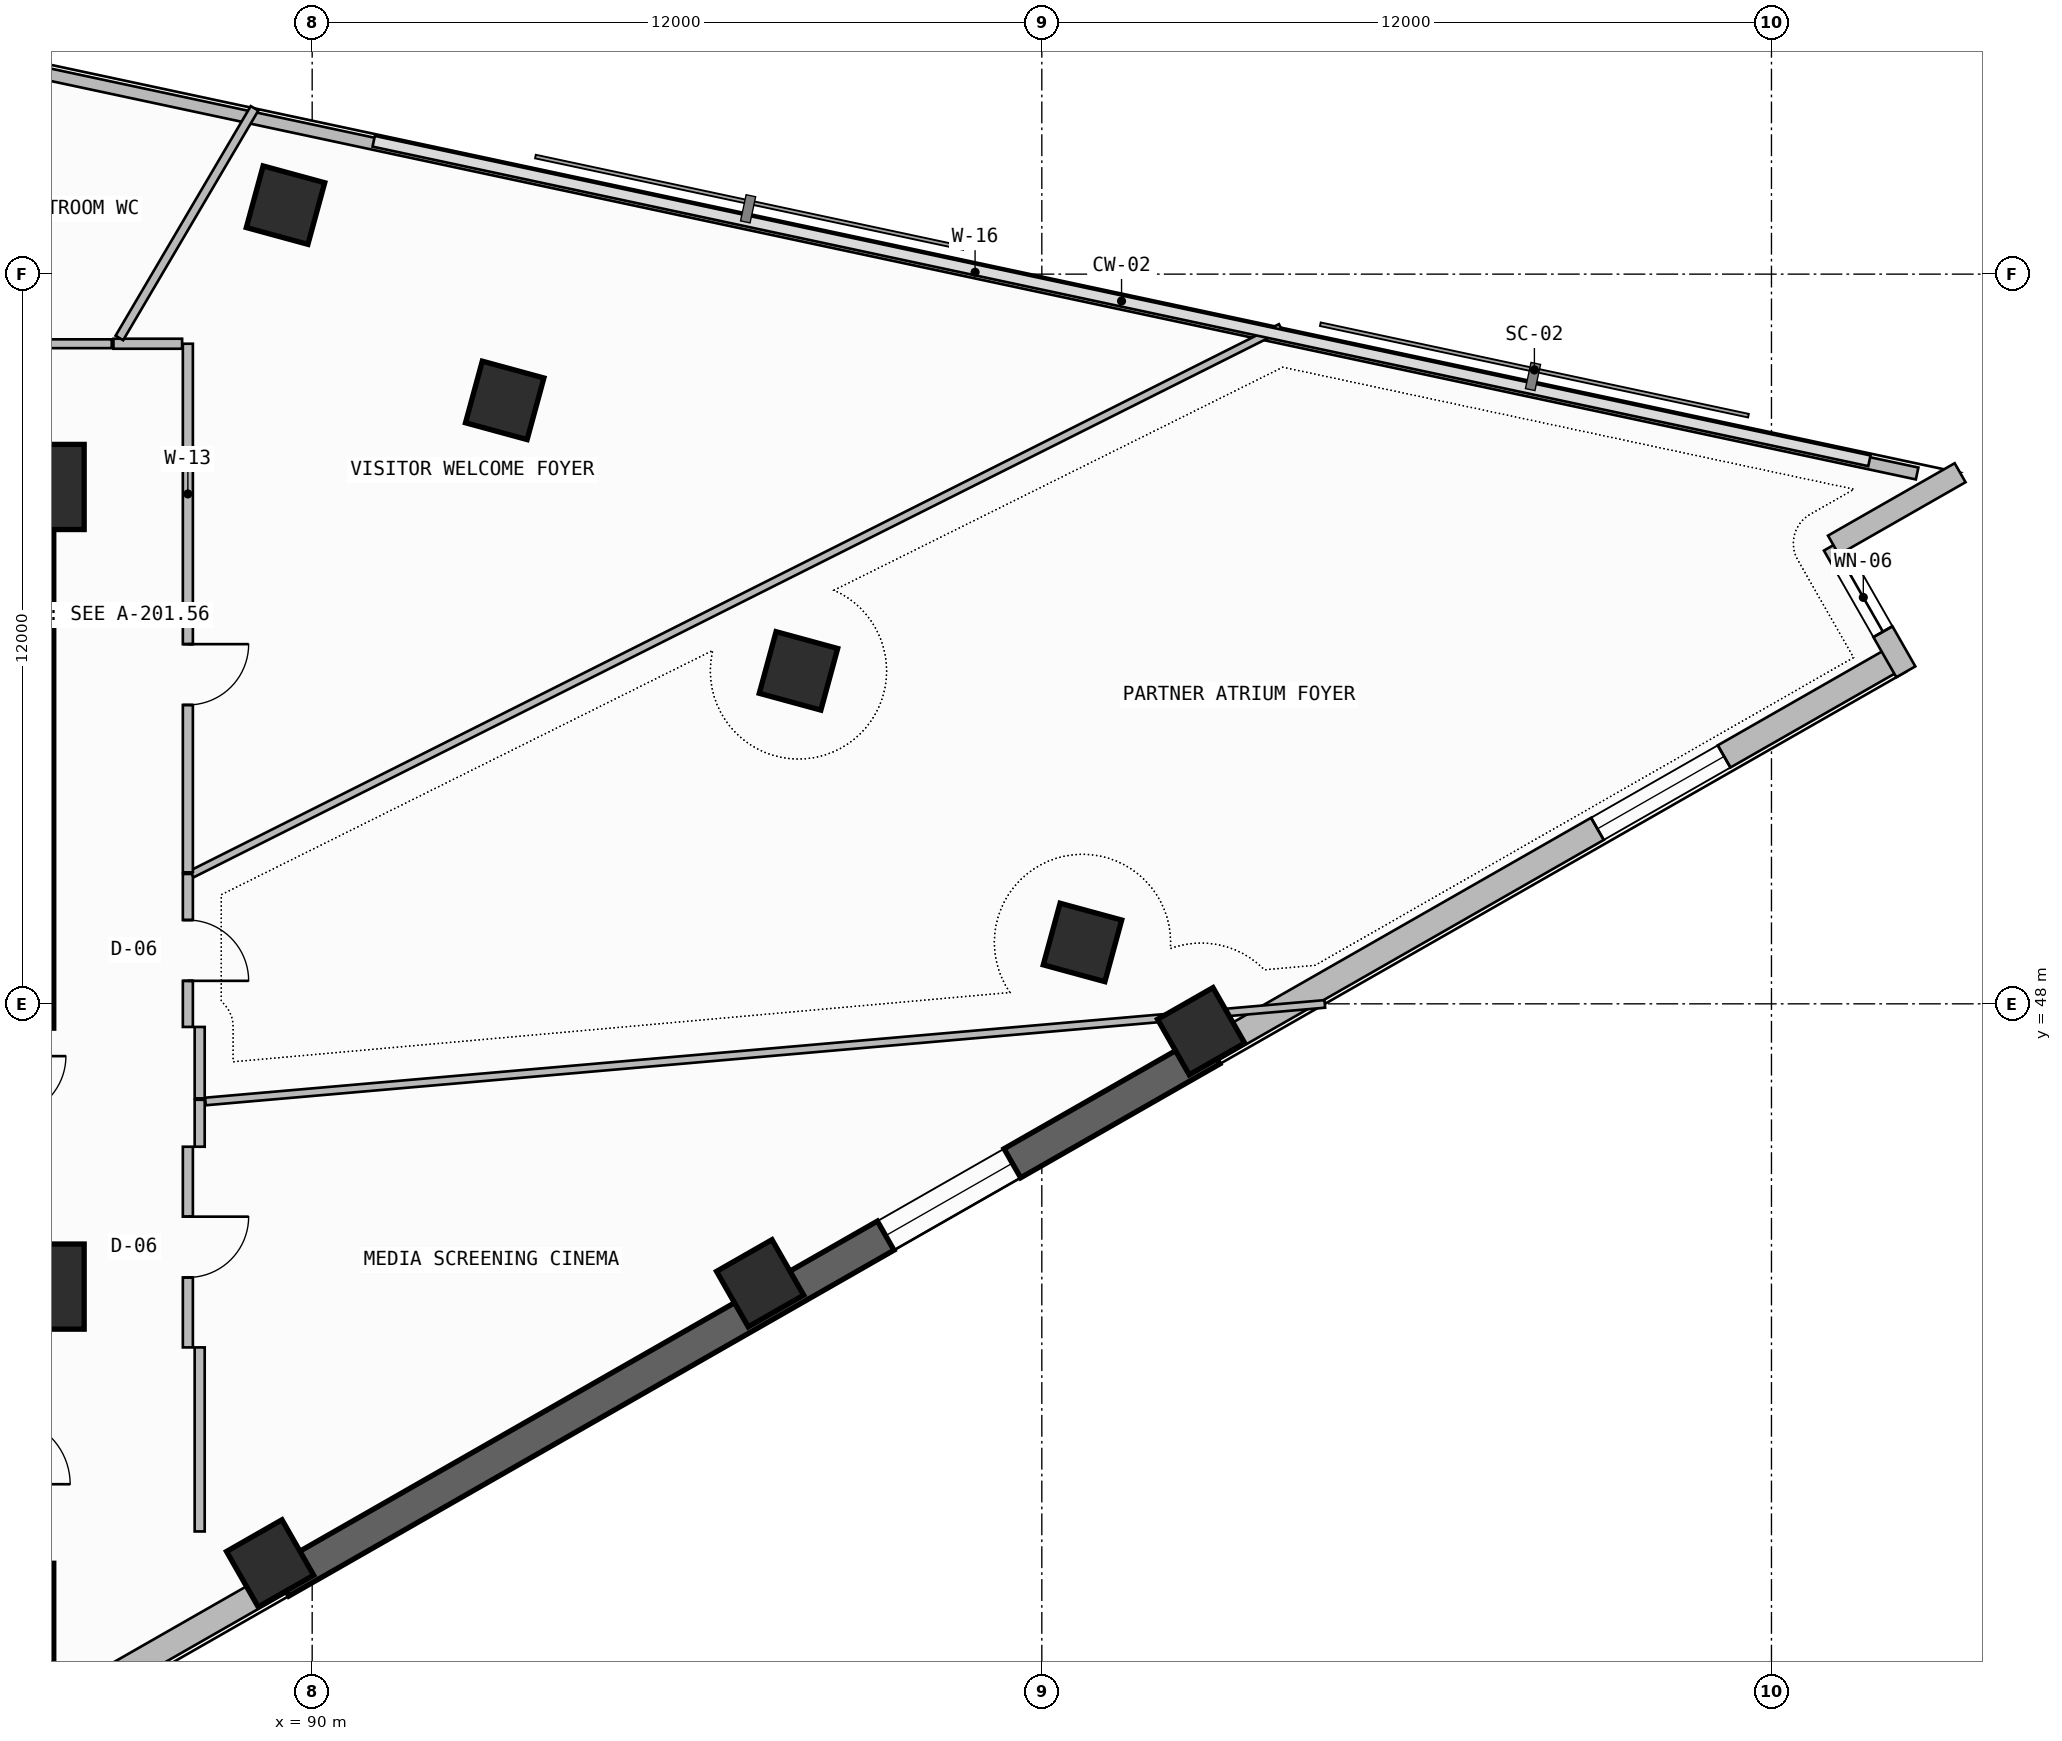
"""IFC4 building model, lengths in metres.
Left out: names, types, materials, properties, quantities, classifications, styles, units other than length and angle.
Written with IfcOpenShell. Run it as: python <this file> out.ifc"""

import sys

from ifc_helpers import new_model, si_unit, direction, frame, frame_2d, origin, origin_2d, place, context, subcontext, project, spatial, rectangle, extrude, element, fill, save


model = new_model("IFC4")
c1 = context("Model", 3, precision=1e-05, world=origin(), true_north=direction((0.0, 1.0)))
c2 = subcontext(c1, "Body", "Model", "MODEL_VIEW")
j1 = project(units=[si_unit("LENGTHUNIT", "METRE"), si_unit("PLANEANGLEUNIT", "RADIAN")], contexts=[c1])
p1 = place(None, origin())
s1 = spatial("IfcSite", under=j1, at=p1, CompositionType="ELEMENT")
p2 = place(p1, origin())
s2 = spatial("IfcBuilding", under=s1, at=p2, CompositionType="ELEMENT")
p3 = place(p2, frame((0.0, 0.0, 200.9)))
s3 = spatial("IfcBuildingStorey", under=s2, at=p3, CompositionType="ELEMENT", Elevation=200.9)
p4 = place(p3, frame((85.375, 35.5, -0.4), z_axis=(0.0, 0.0, 1.0), x_axis=(0.0, 1.0, 0.0)))
e1 = element("IfcWall", 1, at=p4, inside=s3, PredefinedType="SHEAR", context=c2, shape_type="SweptSolid", body=[
    extrude(rectangle(XDim=3.3, YDim=0.75, at=frame_2d((1.65, 0.0))), origin(), (0.0, 0.0, 1.0), 3.66),
])
p5 = place(p3, frame((72.0, 56.425, -0.4), z_axis=(0.0, 0.0, 1.0), x_axis=(1.0, 0.0, 0.0)))
e2 = element("IfcWall", 2, at=p5, inside=s3, PredefinedType="SHEAR", context=c2, shape_type="SweptSolid", body=[
    extrude(rectangle(XDim=13.75, YDim=0.75, at=frame_2d((6.875, 0.0))), origin(), (0.0, 0.0, 1.0), 3.66),
])
p6 = place(p3, frame((85.375, 47.6, -0.4), z_axis=(0.0, 0.0, 1.0), x_axis=(0.0, 1.0, 0.0)))
e3 = element("IfcWall", 3, at=p6, inside=s3, PredefinedType="SHEAR", context=c2, shape_type="SweptSolid", body=[
    extrude(rectangle(XDim=8.45, YDim=0.75, at=frame_2d((4.225, 0.0))), origin(), (0.0, 0.0, 1.0), 3.66),
])
for number, where, z_axis, x_axis in (
    (4, (85.55, 43.35, 0.0), (0.0, 0.0, 1.0), (1.0, 0.0, 0.0)),
    (5, (85.55, 56.5, 0.0), (0.0, 0.0, 1.0), (1.0, 0.0, 0.0)),
):
    element("IfcColumn", number, at=place(p3, frame(where, z_axis=z_axis, x_axis=x_axis)), inside=s3, PredefinedType="COLUMN", context=c2, shape_type="SweptSolid", body=[
        extrude(rectangle(XDim=1.4, YDim=1.4, at=origin_2d()), origin(), (0.0, 0.0, 1.0), 3.52),
    ])
for number, where, z_axis, x_axis in (
    (6, (89.308, 38.799, -0.4), (0.0, 0.0, 1.0), (0.868, 0.496, 0.0)),
    (7, (97.367, 43.405, -0.4), (0.0, 0.0, 1.0), (0.868, 0.496, 0.0)),
):
    element("IfcColumn", number, at=place(p3, frame(where, z_axis=z_axis, x_axis=x_axis)), inside=s3, PredefinedType="COLUMN", context=c2, shape_type="SweptSolid", body=[
        extrude(rectangle(XDim=1.05, YDim=1.05, at=origin_2d()), origin(), (0.0, 0.0, 1.0), 3.92),
    ])
p7 = place(p3, frame((104.62, 47.55, 0.0), z_axis=(0.0, 0.0, 1.0), x_axis=(0.868198814489, 0.496216503675, 0.0)))
e8 = element("IfcColumn", 8, at=p7, inside=s3, PredefinedType="COLUMN", context=c2, shape_type="SweptSolid", body=[
    extrude(rectangle(XDim=1.05, YDim=1.05, at=origin_2d()), origin(), (0.0, 0.0, 1.0), 3.52),
])
for number, where, z_axis, x_axis in (
    (9, (102.669, 49.01, -0.4), (0.0, 0.0, 1.0), (0.263, 0.965, 0.0)),
    (10, (97.998, 53.475, -0.4), (0.0, 0.0, 1.0), (0.263, 0.965, 0.0)),
    (11, (93.167, 57.924, -0.4), (0.0, 0.0, 1.0), (0.263, 0.965, 0.0)),
):
    element("IfcColumn", number, at=place(p3, frame(where, z_axis=z_axis, x_axis=x_axis)), inside=s3, PredefinedType="COLUMN", context=c2, shape_type="SweptSolid", body=[
        extrude(rectangle(XDim=1.05, YDim=1.05, at=origin_2d()), origin(), (0.0, 0.0, 1.0), 3.92),
    ])
p8 = place(p3, frame((89.562, 61.135, 0.0), z_axis=(0.0, 0.0, 1.0), x_axis=(0.263031214458, 0.964787323829, 0.0)))
e12 = element("IfcColumn", 12, at=p8, inside=s3, PredefinedType="COLUMN", context=c2, shape_type="SweptSolid", body=[
    extrude(rectangle(XDim=1.05, YDim=1.05, at=origin_2d()), origin(), (0.0, 0.0, 1.0), 3.52),
])
p9 = place(p3, frame((86.1, 36.568, 0.0), z_axis=(0.0, 0.0, 1.0), x_axis=(0.868192956745, 0.496226752461, 0.0)))
e13 = element("IfcWall", 13, at=p9, inside=s3, PredefinedType="SOLIDWALL", context=c2, shape_type="SweptSolid", body=[
    extrude(rectangle(XDim=3.892, YDim=0.42, at=frame_2d((1.946, 0.0))), origin(), (0.0, 0.0, 1.0), 2.245),
])
p10 = place(p3, frame((89.479, 38.499, -0.4), z_axis=(0.0, 0.0, 1.0), x_axis=(0.868197136736, 0.496219439123, 0.0)))
e14 = element("IfcWall", 14, at=p10, inside=s3, PredefinedType="SHEAR", context=c2, shape_type="SweptSolid", body=[
    extrude(rectangle(XDim=17.636, YDim=0.55, at=frame_2d((8.818, 0.0))), origin(), (0.0, 0.0, 1.0), 3.66),
])
p11 = place(p10, frame((11.464, 0.0, 1.1)))
e15 = element("IfcOpeningElement", 15, at=p11, cuts=e14, PredefinedType="OPENING", context=c2, shape_type="SweptSolid", body=[
    extrude(rectangle(XDim=2.4, YDim=1.2, at=frame_2d((1.2, 0.6))), frame((0.0, 0.285, 0.0), z_axis=(0.0, -1.0, 0.0), x_axis=(1.0, 0.0, 0.0)), (0.0, 0.0, 1.0), 0.57),
])
p12 = place(p3, frame((104.791, 47.25, 0.0), z_axis=(0.0, 0.0, 1.0), x_axis=(0.868193423982, 0.496225934987, 0.0)))
e16 = element("IfcWall", 16, at=p12, inside=s3, PredefinedType="SOLIDWALL", context=c2, shape_type="SweptSolid", body=[
    extrude(rectangle(XDim=12.995, YDim=0.42, at=frame_2d((6.498, 0.0))), origin(), (0.0, 0.0, 1.0), 2.245),
])
p13 = place(p12, frame((7.31, 0.0, 0.965)))
e17 = element("IfcOpeningElement", 17, at=p13, cuts=e16, PredefinedType="OPENING", context=c2, shape_type="SweptSolid", body=[
    extrude(rectangle(XDim=2.4, YDim=1.2, at=frame_2d((1.2, 0.6))), frame((0.0, 0.22, 0.0), z_axis=(0.0, -1.0, 0.0), x_axis=(1.0, 0.0, 0.0)), (0.0, 0.0, 1.0), 0.44),
])
p14 = place(p3, frame((116.21, 53.46, 0.0), z_axis=(0.0, 0.0, 1.0), x_axis=(-0.496215637313, 0.868199309655, 0.0)))
e18 = element("IfcWall", 18, at=p14, inside=s3, PredefinedType="SOLIDWALL", context=c2, shape_type="SweptSolid", body=[
    extrude(rectangle(XDim=2.399, YDim=0.36, at=frame_2d((1.2, 0.0))), origin(), (0.0, 0.0, 1.0), 3.26),
])
p15 = place(p14, frame((0.76, 0.0, 0.45)))
e19 = element("IfcOpeningElement", 19, at=p15, cuts=e18, PredefinedType="OPENING", context=c2, shape_type="SweptSolid", body=[
    extrude(rectangle(XDim=1.3, YDim=2.4, at=frame_2d((0.65, 1.2))), frame((0.0, 0.19, 0.0), z_axis=(0.0, -1.0, 0.0), x_axis=(1.0, 0.0, 0.0)), (0.0, 0.0, 1.0), 0.38),
])
p16 = place(p3, frame((115.019, 55.543, 0.0), z_axis=(0.0, 0.0, 1.0), x_axis=(0.86818053093, 0.4962484919, 0.0)))
e20 = element("IfcWall", 20, at=p16, inside=s3, PredefinedType="SOLIDWALL", context=c2, shape_type="SweptSolid", body=[
    extrude(rectangle(XDim=2.4, YDim=0.36, at=frame_2d((1.2, 0.0))), origin(), (0.0, 0.0, 1.0), 3.26),
])
p17 = place(p3, frame((116.396, 56.722, 0.0), z_axis=(0.0, 0.0, 1.0), x_axis=(-0.977936620644, 0.208901809478, 0.0)))
e21 = element("IfcWall", 21, at=p17, inside=s3, PredefinedType="PARAPET", context=c2, shape_type="SweptSolid", body=[
    extrude(rectangle(XDim=31.685, YDim=0.2, at=frame_2d((15.843, 0.0))), origin(), (0.0, 0.0, 1.0), 1.15),
])
p18 = place(p3, frame((87.955, 42.35, 0.0), z_axis=(0.0, 0.0, 1.0), x_axis=(0.0, 1.0, 0.0)))
e22 = element("IfcWall", 22, at=p18, inside=s3, PredefinedType="PARTITIONING", context=c2, shape_type="SweptSolid", body=[
    extrude(rectangle(XDim=3.3, YDim=0.165, at=frame_2d((1.65, 0.0))), origin(), (0.0, 0.0, 1.0), 2.745),
])
p19 = place(p18, frame((1.15, 0.0, 0.0)))
e23 = element("IfcOpeningElement", 23, at=p19, cuts=e22, PredefinedType="OPENING", context=c2, shape_type="SweptSolid", body=[
    extrude(rectangle(XDim=1.0, YDim=2.2, at=frame_2d((0.5, 1.1))), frame((0.0, 0.093, 0.0), z_axis=(0.0, -1.0, 0.0), x_axis=(1.0, 0.0, 0.0)), (0.0, 0.0, 1.0), 0.185),
])
p20 = place(p3, frame((88.15, 39.323, 0.0), z_axis=(0.0, 0.0, 1.0), x_axis=(0.0, 1.0, 0.0)))
e24 = element("IfcWall", 24, at=p20, inside=s3, PredefinedType="PARTITIONING", context=c2, shape_type="SweptSolid", body=[
    extrude(rectangle(XDim=3.027, YDim=0.165, at=frame_2d((1.514, 0.0))), origin(), (0.0, 0.0, 1.0), 2.745),
])
p21 = place(p3, frame((88.15, 45.65, 0.0), z_axis=(0.0, 0.0, 1.0), x_axis=(0.0, 1.0, 0.0)))
e25 = element("IfcWall", 25, at=p21, inside=s3, PredefinedType="PARTITIONING", context=c2, shape_type="SweptSolid", body=[
    extrude(rectangle(XDim=0.772, YDim=0.165, at=frame_2d((0.386, 0.0))), origin(), (0.0, 0.0, 1.0), 3.26),
])
p22 = place(p3, frame((88.244, 46.394, 0.0), z_axis=(0.0, 0.0, 1.0), x_axis=(0.996222472226, 0.086837698223, 0.0)))
e26 = element("IfcWall", 26, at=p22, inside=s3, PredefinedType="PARTITIONING", context=c2, shape_type="SweptSolid", body=[
    extrude(rectangle(XDim=18.48, YDim=0.125, at=frame_2d((9.24, 0.0))), origin(), (0.0, 0.0, 1.0), 2.245),
])
p23 = place(p3, frame((87.955, 47.62, 0.0), z_axis=(0.0, 0.0, 1.0), x_axis=(0.0, 1.0, 0.0)))
e27 = element("IfcWall", 27, at=p23, inside=s3, PredefinedType="PARTITIONING", context=c2, shape_type="SweptSolid", body=[
    extrude(rectangle(XDim=2.516, YDim=0.165, at=frame_2d((1.258, 0.0))), origin(), (0.0, 0.0, 1.0), 3.26),
])
p24 = place(p23, frame((0.758, 0.0, 0.0)))
e28 = element("IfcOpeningElement", 28, at=p24, cuts=e27, PredefinedType="OPENING", context=c2, shape_type="SweptSolid", body=[
    extrude(rectangle(XDim=1.0, YDim=2.2, at=frame_2d((0.5, 1.1))), frame((0.0, 0.093, 0.0), z_axis=(0.0, -1.0, 0.0), x_axis=(1.0, 0.0, 0.0)), (0.0, 0.0, 1.0), 0.185),
])
p25 = place(p3, frame((88.15, 46.446, 0.0), z_axis=(0.0, 0.0, 1.0), x_axis=(0.0, 1.0, 0.0)))
e29 = element("IfcWall", 29, at=p25, inside=s3, PredefinedType="PARTITIONING", context=c2, shape_type="SweptSolid", body=[
    extrude(rectangle(XDim=1.174, YDim=0.165, at=frame_2d((0.587, 0.0))), origin(), (0.0, 0.0, 1.0), 3.26),
])
p26 = place(p3, frame((88.021, 50.136, 0.0), z_axis=(0.0, 0.0, 1.0), x_axis=(0.893782835211, 0.448499992734, 0.0)))
e30 = element("IfcWall", 30, at=p26, inside=s3, PredefinedType="PARTITIONING", context=c2, shape_type="SweptSolid", body=[
    extrude(rectangle(XDim=20.034, YDim=0.125, at=frame_2d((10.017, 0.0))), origin(), (0.0, 0.0, 1.0), 2.645),
])
p27 = place(p3, frame((87.955, 50.163, 0.0), z_axis=(0.0, 0.0, 1.0), x_axis=(0.0, 1.0, 0.0)))
e31 = element("IfcWall", 31, at=p27, inside=s3, PredefinedType="PARTITIONING", context=c2, shape_type="SweptSolid", body=[
    extrude(rectangle(XDim=8.693, YDim=0.165, at=frame_2d((4.346, 0.0))), origin(), (0.0, 0.0, 1.0), 2.745),
])
p28 = place(p27, frame((2.752, 0.0, 0.0)))
e32 = element("IfcOpeningElement", 32, at=p28, cuts=e31, PredefinedType="OPENING", context=c2, shape_type="SweptSolid", body=[
    extrude(rectangle(XDim=1.0, YDim=2.2, at=frame_2d((0.5, 1.1))), frame((0.0, 0.093, 0.0), z_axis=(0.0, -1.0, 0.0), x_axis=(1.0, 0.0, 0.0)), (0.0, 0.0, 1.0), 0.185),
])
p29 = place(p3, frame((87.861, 58.855, 0.0), z_axis=(0.0, 0.0, 1.0), x_axis=(-1.0, 0.0, 0.0)))
e33 = element("IfcWall", 33, at=p29, inside=s3, PredefinedType="PARTITIONING", context=c2, shape_type="SweptSolid", body=[
    extrude(rectangle(XDim=1.129, YDim=0.165, at=frame_2d((0.565, 0.0))), origin(), (0.0, 0.0, 1.0), 2.745),
])
p30 = place(p3, frame((86.829, 58.95, 0.0), z_axis=(0.0, 0.0, 1.0), x_axis=(0.507234379444, 0.861808148203, 0.0)))
e34 = element("IfcWall", 34, at=p30, inside=s3, PredefinedType="PARTITIONING", context=c2, shape_type="SweptSolid", body=[
    extrude(rectangle(XDim=4.382, YDim=0.145, at=frame_2d((2.191, 0.0))), origin(), (0.0, 0.0, 1.0), 3.26),
])
p31 = place(p3, frame((86.704, 58.855, 0.0), z_axis=(0.0, 0.0, 1.0), x_axis=(-1.0, 0.0, 0.0)))
e35 = element("IfcWall", 35, at=p31, inside=s3, PredefinedType="PARTITIONING", context=c2, shape_type="SweptSolid", body=[
    extrude(rectangle(XDim=7.054, YDim=0.145, at=frame_2d((3.527, 0.0))), origin(), (0.0, 0.0, 1.0), 3.26),
])
p32 = place(p31, frame((3.94, 0.0, 0.0)))
e36 = element("IfcOpeningElement", 36, at=p32, cuts=e35, PredefinedType="OPENING", context=c2, shape_type="SweptSolid", body=[
    extrude(rectangle(XDim=0.9, YDim=2.1, at=frame_2d((0.45, 1.05))), frame((0.0, 0.083, 0.0), z_axis=(0.0, -1.0, 0.0), x_axis=(1.0, 0.0, 0.0)), (0.0, 0.0, 1.0), 0.165),
])
p33 = place(p11, origin())
e37 = element("IfcWindow", 37, at=p33, inside=s3, PartitioningType="SINGLE_PANEL", PredefinedType="WINDOW", context=c2, shape_type="SweptSolid", body=[
    extrude(rectangle(XDim=2.4, YDim=1.2, at=frame_2d((1.2, 0.6))), frame((0.0, 0.03, 0.0), z_axis=(0.0, -1.0, 0.0), x_axis=(1.0, 0.0, 0.0)), (0.0, 0.0, 1.0), 0.06),
])
fill(e15, e37)
p34 = place(p13, origin())
e38 = element("IfcWindow", 38, at=p34, inside=s3, PartitioningType="SINGLE_PANEL", PredefinedType="WINDOW", context=c2, shape_type="SweptSolid", body=[
    extrude(rectangle(XDim=2.4, YDim=1.2, at=frame_2d((1.2, 0.6))), frame((0.0, 0.03, 0.0), z_axis=(0.0, -1.0, 0.0), x_axis=(1.0, 0.0, 0.0)), (0.0, 0.0, 1.0), 0.06),
])
fill(e17, e38)
p35 = place(p15, origin())
e39 = element("IfcWindow", 39, at=p35, inside=s3, PartitioningType="SINGLE_PANEL", PredefinedType="WINDOW", context=c2, shape_type="SweptSolid", body=[
    extrude(rectangle(XDim=1.3, YDim=2.4, at=frame_2d((0.65, 1.2))), frame((0.0, 0.03, 0.0), z_axis=(0.0, -1.0, 0.0), x_axis=(1.0, 0.0, 0.0)), (0.0, 0.0, 1.0), 0.06),
])
fill(e19, e39)
p36 = place(p19, frame((1.0, 0.0, 0.0), z_axis=(0.0, 0.0, 1.0), x_axis=(-1.0, 0.0, 0.0)))
e40 = element("IfcDoor", 40, at=p36, inside=s3, OperationType="SINGLE_SWING_LEFT", PredefinedType="DOOR", context=c2, shape_type="SweptSolid", body=[
    extrude(rectangle(XDim=1.0, YDim=2.2, at=frame_2d((0.5, 1.1))), frame((0.0, 0.025, 0.0), z_axis=(0.0, -1.0, 0.0), x_axis=(1.0, 0.0, 0.0)), (0.0, 0.0, 1.0), 0.05),
])
fill(e23, e40)
p37 = place(p24, frame((1.0, 0.0, 0.0), z_axis=(0.0, 0.0, 1.0), x_axis=(-1.0, 0.0, 0.0)))
e41 = element("IfcDoor", 41, at=p37, inside=s3, OperationType="SINGLE_SWING_RIGHT", PredefinedType="DOOR", context=c2, shape_type="SweptSolid", body=[
    extrude(rectangle(XDim=1.0, YDim=2.2, at=frame_2d((0.5, 1.1))), frame((0.0, 0.025, 0.0), z_axis=(0.0, -1.0, 0.0), x_axis=(1.0, 0.0, 0.0)), (0.0, 0.0, 1.0), 0.05),
])
fill(e28, e41)
p38 = place(p28, frame((1.0, 0.0, 0.0), z_axis=(0.0, 0.0, 1.0), x_axis=(-1.0, 0.0, 0.0)))
e42 = element("IfcDoor", 42, at=p38, inside=s3, OperationType="SINGLE_SWING_LEFT", PredefinedType="DOOR", context=c2, shape_type="SweptSolid", body=[
    extrude(rectangle(XDim=1.0, YDim=2.2, at=frame_2d((0.5, 1.1))), frame((0.0, 0.025, 0.0), z_axis=(0.0, -1.0, 0.0), x_axis=(1.0, 0.0, 0.0)), (0.0, 0.0, 1.0), 0.05),
])
fill(e32, e42)
save(model, sys.argv[1])
